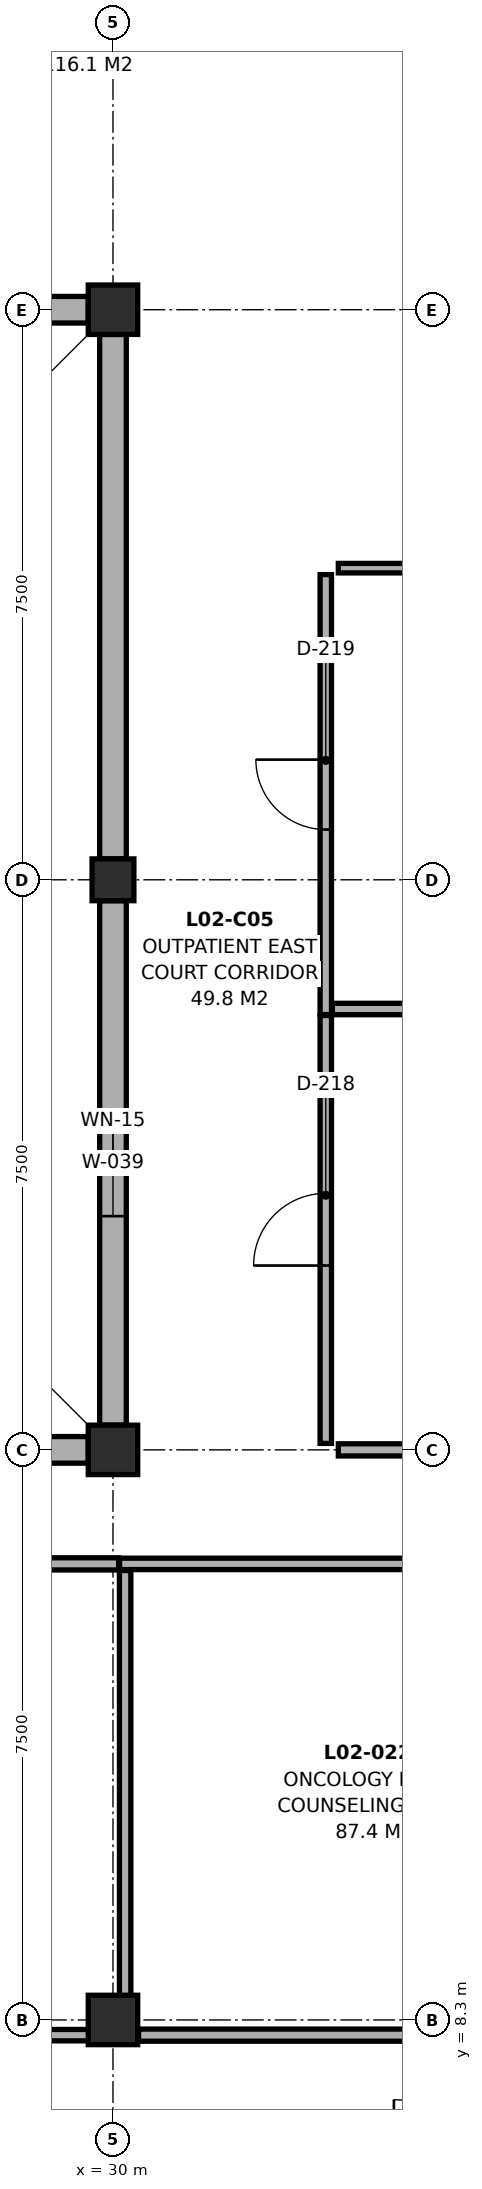
"""IFC4 building model, lengths in metres.
Left out: names, types, materials, properties, quantities, classifications, styles, units other than length and angle.
Written with IfcOpenShell. Run it as: python <this file> out.ifc"""

import sys

from ifc_helpers import new_model, si_unit, direction, frame, frame_2d, origin, origin_2d, place, context, subcontext, project, spatial, rectangle, extrude, element, fill, save


model = new_model("IFC4")
c1 = context("Model", 3, precision=1e-05, world=origin(), true_north=direction((0.0, 1.0)))
c2 = subcontext(c1, "Body", "Model", "MODEL_VIEW")
j1 = project(units=[si_unit("LENGTHUNIT", "METRE"), si_unit("PLANEANGLEUNIT", "RADIAN")], contexts=[c1])
p1 = place(None, origin())
s1 = spatial("IfcSite", under=j1, at=p1, CompositionType="ELEMENT")
p2 = place(p1, origin())
s2 = spatial("IfcBuilding", under=s1, at=p2, CompositionType="ELEMENT")
p3 = place(p2, frame((0.0, 0.0, 9.5)))
s3 = spatial("IfcBuildingStorey", under=s2, at=p3, CompositionType="ELEMENT", Elevation=9.5)
for number, where, z_axis, x_axis in (
    (1, (30.0, 8.3, 0.0), (0.0, 0.0, 1.0), (1.0, 0.0, 0.0)),
    (2, (30.0, 15.8, 0.0), (0.0, 0.0, 1.0), (1.0, 0.0, 0.0)),
):
    element("IfcColumn", number, at=place(p3, frame(where, z_axis=z_axis, x_axis=x_axis)), inside=s3, PredefinedType="COLUMN", context=c2, shape_type="SweptSolid", body=[
        extrude(rectangle(XDim=0.65, YDim=0.65, at=origin_2d()), origin(), (0.0, 0.0, 1.0), 3.7),
    ])
p4 = place(p3, frame((30.0, 23.3, 0.0), z_axis=(0.0, 0.0, 1.0), x_axis=(1.0, 0.0, 0.0)))
e3 = element("IfcColumn", 3, at=p4, inside=s3, PredefinedType="COLUMN", context=c2, shape_type="SweptSolid", body=[
    extrude(rectangle(XDim=0.55, YDim=0.55, at=origin_2d()), origin(), (0.0, 0.0, 1.0), 3.7),
])
p5 = place(p3, frame((30.0, 30.8, 0.0), z_axis=(0.0, 0.0, 1.0), x_axis=(1.0, 0.0, 0.0)))
e4 = element("IfcColumn", 4, at=p5, inside=s3, PredefinedType="COLUMN", context=c2, shape_type="SweptSolid", body=[
    extrude(rectangle(XDim=0.65, YDim=0.65, at=origin_2d()), origin(), (0.0, 0.0, 1.0), 3.7),
])
p6 = place(p3, frame((22.825, 15.8, 0.0), z_axis=(0.0, 0.0, 1.0), x_axis=(1.0, 0.0, 0.0)))
e5 = element("IfcWall", 5, at=p6, inside=s3, PredefinedType="SOLIDWALL", context=c2, shape_type="SweptSolid", body=[
    extrude(rectangle(XDim=6.85, YDim=0.35, at=frame_2d((3.425, 0.0))), origin(), (0.0, 0.0, 1.0), 2.785),
])
p7 = place(p6, frame((2.725, 0.0, 0.9)))
e6 = element("IfcOpeningElement", 6, at=p7, cuts=e5, PredefinedType="OPENING", context=c2, shape_type="SweptSolid", body=[
    extrude(rectangle(XDim=1.4, YDim=1.5, at=frame_2d((0.7, 0.75))), frame((0.0, 0.187, 0.0), z_axis=(0.0, -1.0, 0.0), x_axis=(1.0, 0.0, 0.0)), (0.0, 0.0, 1.0), 0.374),
])
p8 = place(p3, frame((30.0, 16.125, 0.0), z_axis=(0.0, 0.0, 1.0), x_axis=(0.0, 1.0, 0.0)))
e7 = element("IfcWall", 7, at=p8, inside=s3, PredefinedType="SOLIDWALL", context=c2, shape_type="SweptSolid", body=[
    extrude(rectangle(XDim=6.9, YDim=0.35, at=frame_2d((3.45, 0.0))), origin(), (0.0, 0.0, 1.0), 2.985),
])
p9 = place(p8, frame((2.75, 0.0, 0.9)))
e8 = element("IfcOpeningElement", 8, at=p9, cuts=e7, PredefinedType="OPENING", context=c2, shape_type="SweptSolid", body=[
    extrude(rectangle(XDim=1.4, YDim=1.7, at=frame_2d((0.7, 0.85))), frame((0.0, 0.187, 0.0), z_axis=(0.0, -1.0, 0.0), x_axis=(1.0, 0.0, 0.0)), (0.0, 0.0, 1.0), 0.374),
])
p10 = place(p3, frame((30.0, 23.575, 0.0), z_axis=(0.0, 0.0, 1.0), x_axis=(0.0, 1.0, 0.0)))
e9 = element("IfcWall", 9, at=p10, inside=s3, PredefinedType="SOLIDWALL", context=c2, shape_type="SweptSolid", body=[
    extrude(rectangle(XDim=6.9, YDim=0.35, at=frame_2d((3.45, 0.0))), origin(), (0.0, 0.0, 1.0), 2.985),
])
p11 = place(p3, frame((29.675, 30.8, 0.0), z_axis=(0.0, 0.0, 1.0), x_axis=(-1.0, 0.0, 0.0)))
e10 = element("IfcWall", 10, at=p11, inside=s3, PredefinedType="SOLIDWALL", context=c2, shape_type="SweptSolid", body=[
    extrude(rectangle(XDim=6.85, YDim=0.35, at=frame_2d((3.425, 0.0))), origin(), (0.0, 0.0, 1.0), 2.785),
])
p12 = place(p3, frame((15.337, 8.1, 0.0), z_axis=(0.0, 0.0, 1.0), x_axis=(1.0, 0.0, 0.0)))
e11 = element("IfcWall", 11, at=p12, inside=s3, PredefinedType="PARTITIONING", context=c2, shape_type="SweptSolid", body=[
    extrude(rectangle(XDim=14.571, YDim=0.15, at=frame_2d((7.286, 0.0))), origin(), (0.0, 0.0, 1.0), 2.785),
])
p13 = place(p12, frame((7.677, 0.0, 0.0)))
e12 = element("IfcOpeningElement", 12, at=p13, cuts=e11, PredefinedType="OPENING", context=c2, shape_type="SweptSolid", body=[
    extrude(rectangle(XDim=1.56, YDim=2.3, at=frame_2d((0.78, 1.15))), frame((0.0, 0.087, 0.0), z_axis=(0.0, -1.0, 0.0), x_axis=(1.0, 0.0, 0.0)), (0.0, 0.0, 1.0), 0.174),
])
p14 = place(p3, frame((30.337, 8.1, 0.0), z_axis=(0.0, 0.0, 1.0), x_axis=(1.0, 0.0, 0.0)))
e13 = element("IfcWall", 13, at=p14, inside=s3, PredefinedType="PARTITIONING", context=c2, shape_type="SweptSolid", body=[
    extrude(rectangle(XDim=14.376, YDim=0.16, at=frame_2d((7.188, 0.0))), origin(), (0.0, 0.0, 1.0), 2.985),
])
p15 = place(p14, frame((7.89, 0.0, 0.0)))
e14 = element("IfcOpeningElement", 14, at=p15, cuts=e13, PredefinedType="OPENING", context=c2, shape_type="SweptSolid", body=[
    extrude(rectangle(XDim=1.65, YDim=2.32, at=frame_2d((0.825, 1.16))), frame((0.0, 0.092, 0.0), z_axis=(0.0, -1.0, 0.0), x_axis=(1.0, 0.0, 0.0)), (0.0, 0.0, 1.0), 0.184),
])
p16 = place(p3, frame((32.8, 15.885, 0.0), z_axis=(0.0, 0.0, 1.0), x_axis=(0.0, 1.0, 0.0)))
e15 = element("IfcWall", 15, at=p16, inside=s3, PredefinedType="PARTITIONING", context=c2, shape_type="SweptSolid", body=[
    extrude(rectangle(XDim=5.63, YDim=0.15, at=frame_2d((2.815, 0.0))), origin(), (0.0, 0.0, 1.0), 2.985),
])
p17 = place(p16, frame((2.34, 0.0, 0.0)))
e16 = element("IfcOpeningElement", 16, at=p17, cuts=e15, PredefinedType="OPENING", context=c2, shape_type="SweptSolid", body=[
    extrude(rectangle(XDim=0.95, YDim=2.15, at=frame_2d((0.475, 1.075))), frame((0.0, 0.087, 0.0), z_axis=(0.0, -1.0, 0.0), x_axis=(1.0, 0.0, 0.0)), (0.0, 0.0, 1.0), 0.174),
])
p18 = place(p3, frame((32.8, 21.527, 0.0), z_axis=(0.0, 0.0, 1.0), x_axis=(0.0, 1.0, 0.0)))
e17 = element("IfcWall", 17, at=p18, inside=s3, PredefinedType="PARTITIONING", context=c2, shape_type="SweptSolid", body=[
    extrude(rectangle(XDim=5.788, YDim=0.15, at=frame_2d((2.894, 0.0))), origin(), (0.0, 0.0, 1.0), 2.985),
])
p19 = place(p18, frame((2.434, 0.0, 0.0)))
e18 = element("IfcOpeningElement", 18, at=p19, cuts=e17, PredefinedType="OPENING", context=c2, shape_type="SweptSolid", body=[
    extrude(rectangle(XDim=0.92, YDim=2.1, at=frame_2d((0.46, 1.05))), frame((0.0, 0.087, 0.0), z_axis=(0.0, -1.0, 0.0), x_axis=(1.0, 0.0, 0.0)), (0.0, 0.0, 1.0), 0.174),
])
p20 = place(p3, frame((15.485, 14.3, 0.0), z_axis=(0.0, 0.0, 1.0), x_axis=(1.0, 0.0, 0.0)))
e19 = element("IfcWall", 19, at=p20, inside=s3, PredefinedType="PARTITIONING", context=c2, shape_type="SweptSolid", body=[
    extrude(rectangle(XDim=14.59, YDim=0.16, at=frame_2d((7.295, 0.0))), origin(), (0.0, 0.0, 1.0), 2.785),
])
p21 = place(p3, frame((30.087, 14.3, 0.0), z_axis=(0.0, 0.0, 1.0), x_axis=(1.0, 0.0, 0.0)))
e20 = element("IfcWall", 20, at=p21, inside=s3, PredefinedType="PARTITIONING", context=c2, shape_type="SweptSolid", body=[
    extrude(rectangle(XDim=14.726, YDim=0.15, at=frame_2d((7.363, 0.0))), origin(), (0.0, 0.0, 1.0), 2.985),
])
p22 = place(p3, frame((30.16, 8.432, 0.0), z_axis=(0.0, 0.0, 1.0), x_axis=(0.0, 1.0, 0.0)))
e21 = element("IfcWall", 21, at=p22, inside=s3, PredefinedType="PARTITIONING", context=c2, shape_type="SweptSolid", body=[
    extrude(rectangle(XDim=5.781, YDim=0.15, at=frame_2d((2.891, 0.0))), origin(), (0.0, 0.0, 1.0), 2.985),
])
p23 = place(p3, frame((32.965, 15.8, 0.0), z_axis=(0.0, 0.0, 1.0), x_axis=(1.0, 0.0, 0.0)))
e22 = element("IfcWall", 22, at=p23, inside=s3, PredefinedType="PARTITIONING", context=c2, shape_type="SweptSolid", body=[
    extrude(rectangle(XDim=5.47, YDim=0.16, at=frame_2d((2.735, 0.0))), origin(), (0.0, 0.0, 1.0), 2.985),
])
p24 = place(p3, frame((32.887, 21.6, 0.0), z_axis=(0.0, 0.0, 1.0), x_axis=(1.0, 0.0, 0.0)))
e23 = element("IfcWall", 23, at=p24, inside=s3, PredefinedType="PARTITIONING", context=c2, shape_type="SweptSolid", body=[
    extrude(rectangle(XDim=5.621, YDim=0.15, at=frame_2d((2.811, 0.0))), origin(), (0.0, 0.0, 1.0), 2.985),
])
p25 = place(p3, frame((32.965, 27.4, 0.0), z_axis=(0.0, 0.0, 1.0), x_axis=(1.0, 0.0, 0.0)))
e24 = element("IfcWall", 24, at=p25, inside=s3, PredefinedType="PARTITIONING", context=c2, shape_type="SweptSolid", body=[
    extrude(rectangle(XDim=5.47, YDim=0.125, at=frame_2d((2.735, 0.0))), origin(), (0.0, 0.0, 1.0), 2.985),
])
p26 = place(p9, origin())
e25 = element("IfcWindow", 25, at=p26, inside=s3, PartitioningType="SINGLE_PANEL", PredefinedType="WINDOW", context=c2, shape_type="SweptSolid", body=[
    extrude(rectangle(XDim=1.4, YDim=1.7, at=frame_2d((0.7, 0.85))), frame((0.0, 0.03, 0.0), z_axis=(0.0, -1.0, 0.0), x_axis=(1.0, 0.0, 0.0)), (0.0, 0.0, 1.0), 0.06),
])
fill(e8, e25)
p27 = place(p17, origin())
e26 = element("IfcDoor", 26, at=p27, inside=s3, OperationType="SINGLE_SWING_LEFT", PredefinedType="DOOR", context=c2, shape_type="SweptSolid", body=[
    extrude(rectangle(XDim=0.95, YDim=2.15, at=frame_2d((0.475, 1.075))), frame((0.0, 0.025, 0.0), z_axis=(0.0, -1.0, 0.0), x_axis=(1.0, 0.0, 0.0)), (0.0, 0.0, 1.0), 0.05),
])
fill(e16, e26)
p28 = place(p19, origin())
e27 = element("IfcDoor", 27, at=p28, inside=s3, OperationType="SINGLE_SWING_RIGHT", PredefinedType="DOOR", context=c2, shape_type="SweptSolid", body=[
    extrude(rectangle(XDim=0.92, YDim=2.1, at=frame_2d((0.46, 1.05))), frame((0.0, 0.025, 0.0), z_axis=(0.0, -1.0, 0.0), x_axis=(1.0, 0.0, 0.0)), (0.0, 0.0, 1.0), 0.05),
])
fill(e18, e27)
save(model, sys.argv[1])
